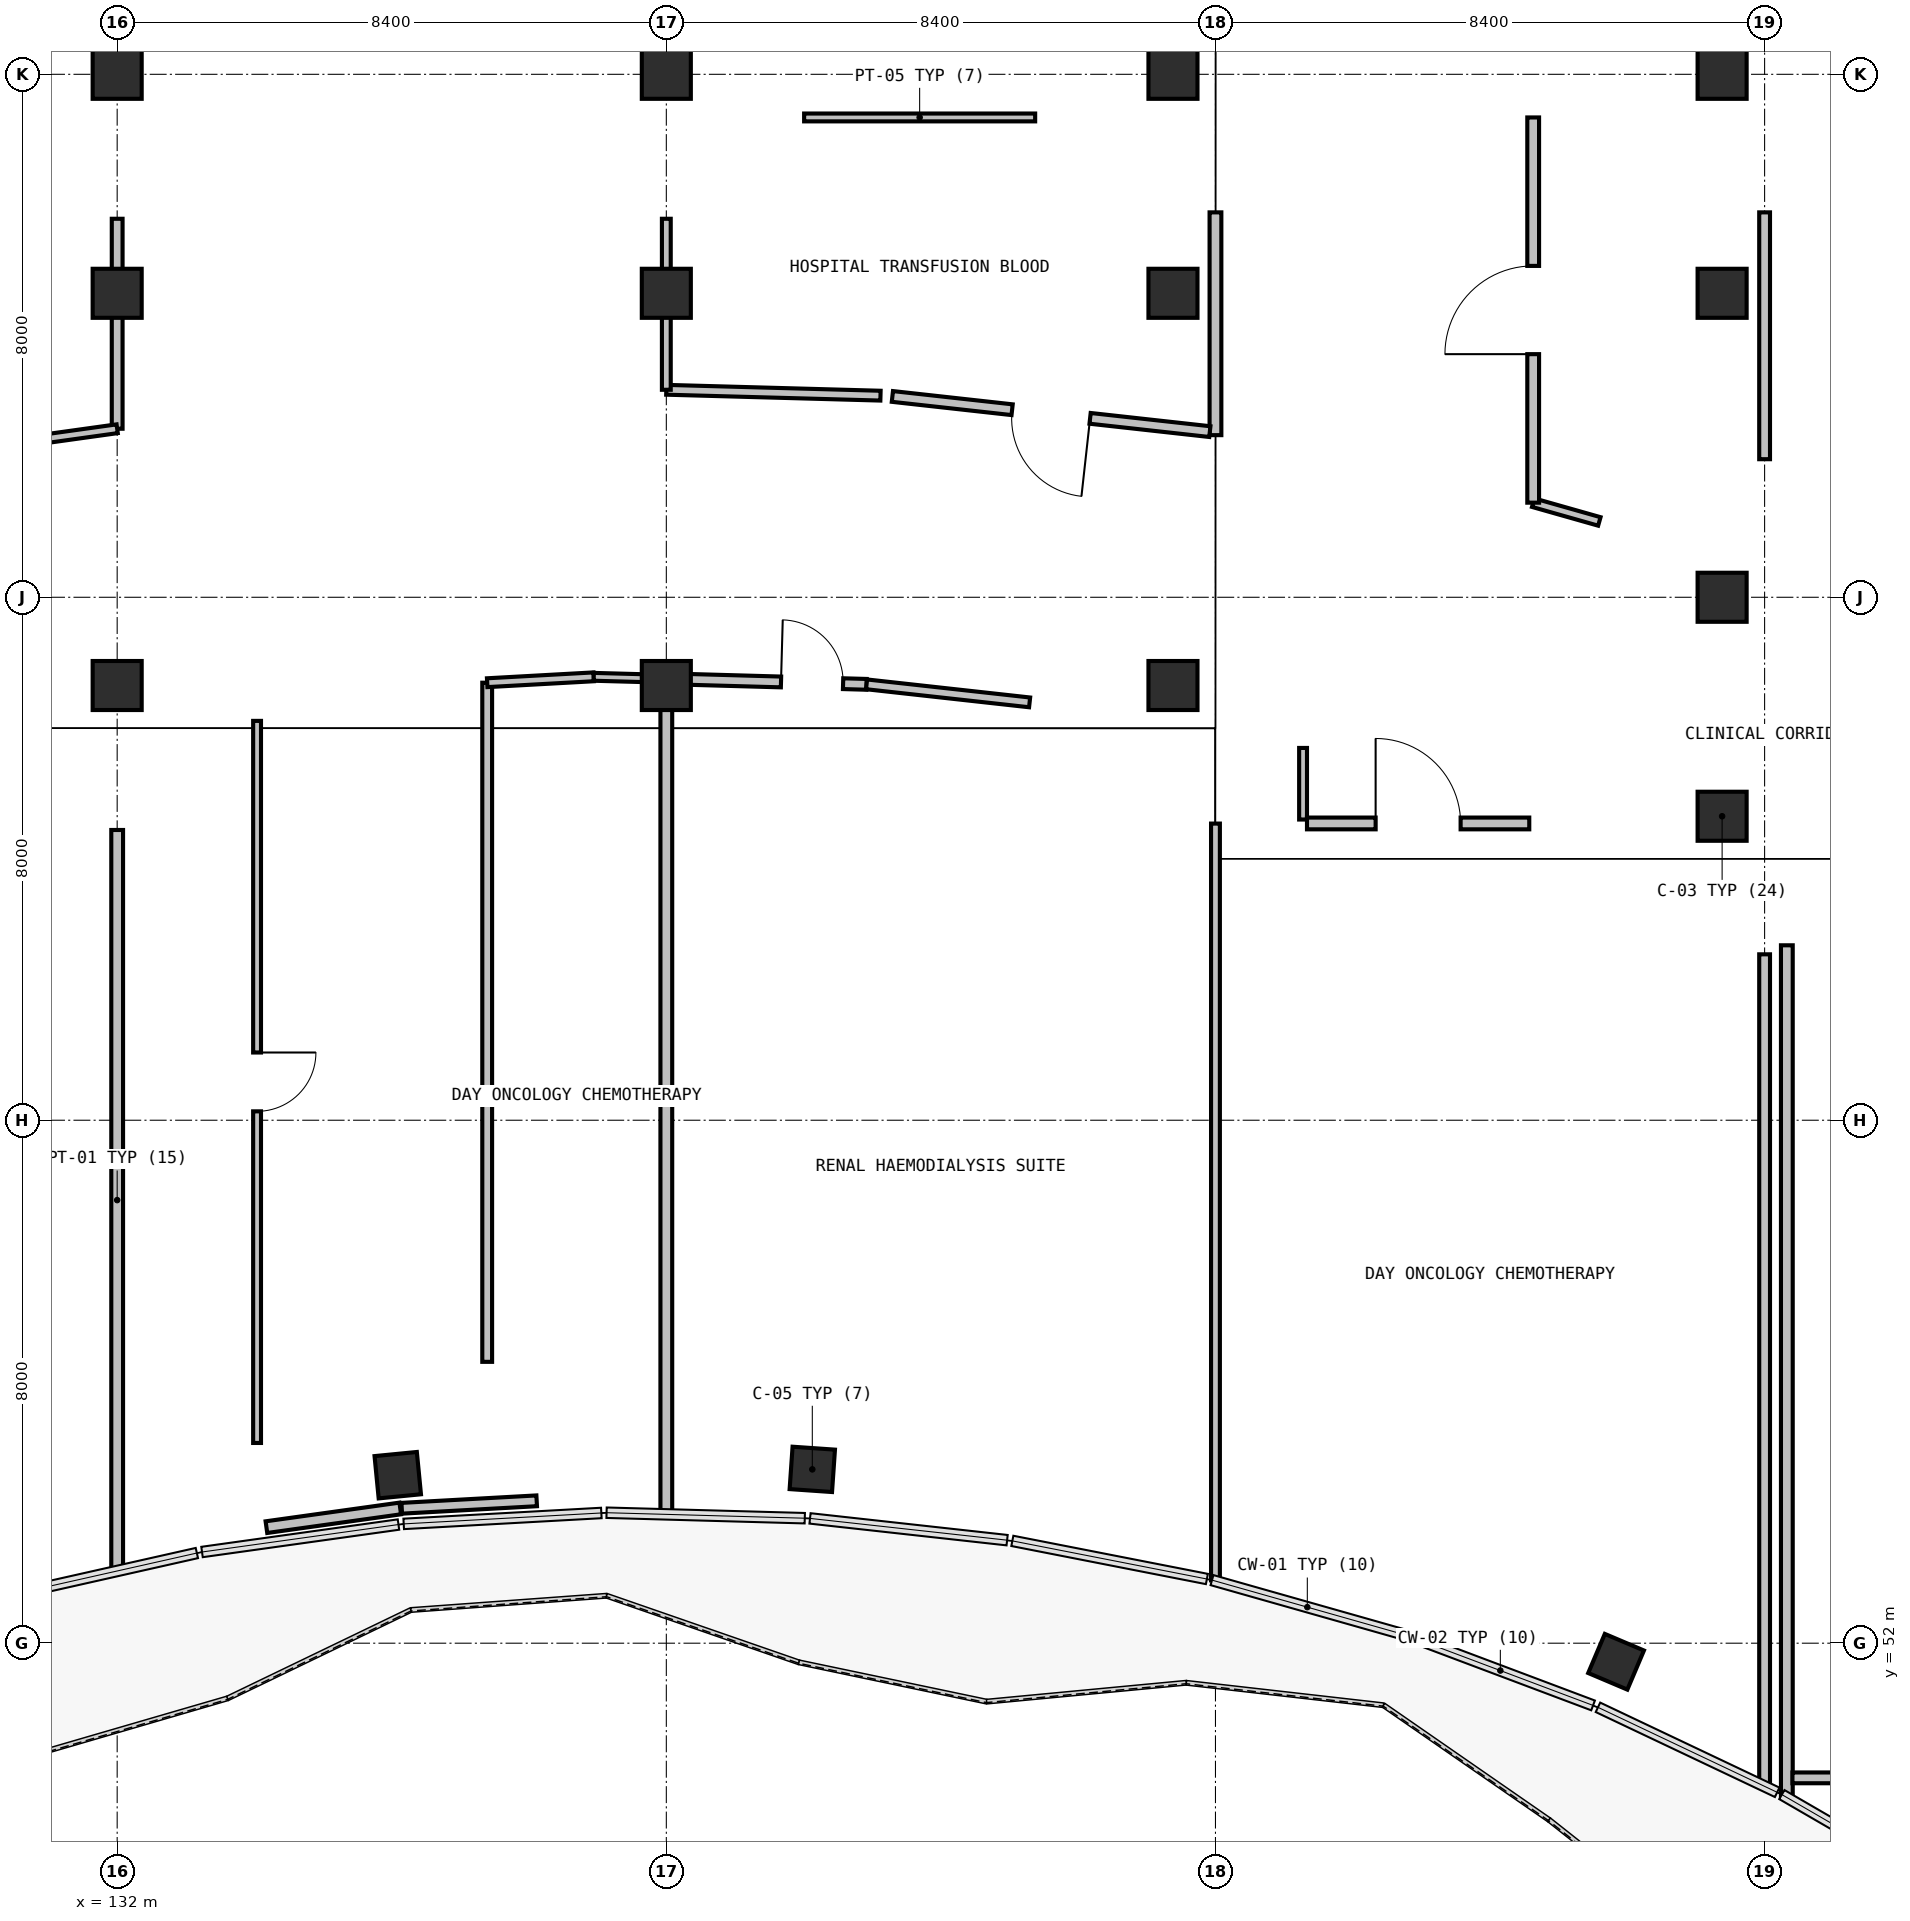
"""IFC4 building model, lengths in metres.
Left out: names, types, materials, properties, quantities, classifications, styles, units other than length and angle.
Written with IfcOpenShell. Run it as: python <this file> out.ifc"""

import sys

from ifc_helpers import new_model, si_unit, direction, frame, frame_2d, origin, origin_2d, place, context, subcontext, project, spatial, rectangle, extrude, element, fill, save


model = new_model("IFC4")
c1 = context("Model", 3, precision=1e-05, world=origin(), true_north=direction((0.0, 1.0)))
c2 = subcontext(c1, "Body", "Model", "MODEL_VIEW")
j1 = project(units=[si_unit("LENGTHUNIT", "METRE"), si_unit("PLANEANGLEUNIT", "RADIAN")], contexts=[c1])
p1 = place(None, origin())
s1 = spatial("IfcSite", under=j1, at=p1, CompositionType="ELEMENT")
p2 = place(p1, origin())
s2 = spatial("IfcBuilding", under=s1, at=p2, CompositionType="ELEMENT")
p3 = place(p2, frame((0.0, 0.0, 15.0)))
s3 = spatial("IfcBuildingStorey", under=s2, at=p3, CompositionType="ELEMENT", Elevation=15.0)
for number, where, z_axis, x_axis in (
    (1, (132.0, 66.65, 0.0), (0.0, 0.0, 1.0), (1.0, 0.0, 0.0)),
    (2, (132.0, 72.65, 0.0), (0.0, 0.0, 1.0), (1.0, 0.0, 0.0)),
    (3, (132.0, 76.0, 0.0), (0.0, 0.0, 1.0), (1.0, 0.0, 0.0)),
    (4, (140.4, 66.65, 0.0), (0.0, 0.0, 1.0), (1.0, 0.0, 0.0)),
    (5, (140.4, 72.65, 0.0), (0.0, 0.0, 1.0), (1.0, 0.0, 0.0)),
    (6, (140.4, 76.0, 0.0), (0.0, 0.0, 1.0), (1.0, 0.0, 0.0)),
    (7, (148.15, 66.65, 0.0), (0.0, 0.0, 1.0), (1.0, 0.0, 0.0)),
    (8, (148.15, 72.65, 0.0), (0.0, 0.0, 1.0), (1.0, 0.0, 0.0)),
    (9, (148.15, 76.0, 0.0), (0.0, 0.0, 1.0), (1.0, 0.0, 0.0)),
    (10, (156.55, 64.65, 0.0), (0.0, 0.0, 1.0), (1.0, 0.0, 0.0)),
    (11, (156.55, 68.0, 0.0), (0.0, 0.0, 1.0), (1.0, 0.0, 0.0)),
    (12, (156.55, 72.65, 0.0), (0.0, 0.0, 1.0), (1.0, 0.0, 0.0)),
    (13, (156.55, 76.0, 0.0), (0.0, 0.0, 1.0), (1.0, 0.0, 0.0)),
):
    element("IfcColumn", number, at=place(p3, frame(where, z_axis=z_axis, x_axis=x_axis)), inside=s3, PredefinedType="COLUMN", context=c2, shape_type="SweptSolid", body=[
        extrude(rectangle(XDim=0.75, YDim=0.75, at=origin_2d()), origin(), (0.0, 0.0, 1.0), 4.2),
    ])
for number, where, z_axis, x_axis in (
    (14, (136.292, 54.57, 0.0), (0.0, 0.0, 1.0), (-0.097, 0.995, 0.0)),
    (15, (142.633, 54.659, 0.0), (0.0, 0.0, 1.0), (0.069, 0.998, 0.0)),
    (16, (154.928, 51.716, 0.0), (0.0, 0.0, 1.0), (0.39, 0.921, 0.0)),
):
    element("IfcColumn", number, at=place(p3, frame(where, z_axis=z_axis, x_axis=x_axis)), inside=s3, PredefinedType="COLUMN", context=c2, shape_type="SweptSolid", body=[
        extrude(rectangle(XDim=0.65, YDim=0.65, at=origin_2d()), origin(), (0.0, 0.0, 1.0), 3.91),
    ])
p4 = place(p3, frame((132.0, 64.44, 0.0), z_axis=(0.0, 0.0, 1.0), x_axis=(0.0, -1.0, 0.0)))
e17 = element("IfcWall", 17, at=p4, inside=s3, PredefinedType="PARTITIONING", context=c2, shape_type="SweptSolid", body=[
    extrude(rectangle(XDim=11.324, YDim=0.18, at=frame_2d((5.662, 0.0))), origin(), (0.0, 0.0, 1.0), 3.895),
])
p5 = place(p3, frame((132.0, 73.79, 0.0), z_axis=(0.0, 0.0, 1.0), x_axis=(0.0, -1.0, 0.0)))
e18 = element("IfcWall", 18, at=p5, inside=s3, PredefinedType="PARTITIONING", context=c2, shape_type="SweptSolid", body=[
    extrude(rectangle(XDim=3.212, YDim=0.165, at=frame_2d((1.606, 0.0))), origin(), (0.0, 0.0, 1.0), 3.245),
])
p6 = place(p3, frame((132.0, 70.578, 0.0), z_axis=(0.0, 0.0, 1.0), x_axis=(-0.990423758249, -0.13806078044, 0.0)))
e19 = element("IfcWall", 19, at=p6, inside=s3, PredefinedType="PARTITIONING", context=c2, shape_type="SweptSolid", body=[
    extrude(rectangle(XDim=1.729, YDim=0.135, at=frame_2d((0.865, 0.0))), origin(), (0.0, 0.0, 1.0), 3.895),
])
p7 = place(p3, frame((134.14, 66.109, 0.0), z_axis=(0.0, 0.0, 1.0), x_axis=(0.0, -1.0, 0.0)))
e20 = element("IfcWall", 20, at=p7, inside=s3, PredefinedType="PARTITIONING", context=c2, shape_type="SweptSolid", body=[
    extrude(rectangle(XDim=11.046, YDim=0.12, at=frame_2d((5.523, 0.0))), origin(), (0.0, 0.0, 1.0), 3.895),
])
p8 = place(p7, frame((5.073, 0.0, 0.0)))
e21 = element("IfcOpeningElement", 21, at=p8, cuts=e20, PredefinedType="OPENING", context=c2, shape_type="SweptSolid", body=[
    extrude(rectangle(XDim=0.9, YDim=2.1, at=frame_2d((0.45, 1.05))), frame((0.0, 0.07, 0.0), z_axis=(0.0, -1.0, 0.0), x_axis=(1.0, 0.0, 0.0)), (0.0, 0.0, 1.0), 0.14),
])
p9 = place(p3, frame((134.283, 53.775, 0.0), z_axis=(0.0, 0.0, 1.0), x_axis=(0.990372536163, 0.138427741489, 0.0)))
e22 = element("IfcWall", 22, at=p9, inside=s3, PredefinedType="PARTITIONING", context=c2, shape_type="SweptSolid", body=[
    extrude(rectangle(XDim=2.067, YDim=0.18, at=frame_2d((1.034, 0.0))), origin(), (0.0, 0.0, 1.0), 3.895),
])
p10 = place(p3, frame((136.353, 54.064, 0.0), z_axis=(0.0, 0.0, 1.0), x_axis=(0.998477747352, 0.055156033595, 0.0)))
e23 = element("IfcWall", 23, at=p10, inside=s3, PredefinedType="PARTITIONING", context=c2, shape_type="SweptSolid", body=[
    extrude(rectangle(XDim=2.067, YDim=0.165, at=frame_2d((1.034, 0.0))), origin(), (0.0, 0.0, 1.0), 3.895),
])
p11 = place(p3, frame((137.66, 56.304, 0.0), z_axis=(0.0, 0.0, 1.0), x_axis=(0.0, 1.0, 0.0)))
e24 = element("IfcWall", 24, at=p11, inside=s3, PredefinedType="PARTITIONING", context=c2, shape_type="SweptSolid", body=[
    extrude(rectangle(XDim=10.389, YDim=0.15, at=frame_2d((5.195, 0.0))), origin(), (0.0, 0.0, 1.0), 3.895),
])
p12 = place(p3, frame((137.66, 66.693, 0.0), z_axis=(0.0, 0.0, 1.0), x_axis=(0.998484643385, 0.055031054181, 0.0)))
e25 = element("IfcWall", 25, at=p12, inside=s3, PredefinedType="PARTITIONING", context=c2, shape_type="SweptSolid", body=[
    extrude(rectangle(XDim=1.633, YDim=0.135, at=frame_2d((0.816, 0.0))), origin(), (0.0, 0.0, 1.0), 3.195),
])
p13 = place(p3, frame((139.29, 66.783, 0.0), z_axis=(0.0, 0.0, 1.0), x_axis=(0.999634166902, -0.027046854934, 0.0)))
e26 = element("IfcWall", 26, at=p13, inside=s3, PredefinedType="PARTITIONING", context=c2, shape_type="SweptSolid", body=[
    extrude(rectangle(XDim=1.11, YDim=0.12, at=frame_2d((0.555, 0.0))), origin(), (0.0, 0.0, 1.0), 3.195),
])
p14 = place(p3, frame((140.4, 66.753, 0.0), z_axis=(0.0, 0.0, 1.0), x_axis=(0.0, -1.0, 0.0)))
e27 = element("IfcWall", 27, at=p14, inside=s3, PredefinedType="PARTITIONING", context=c2, shape_type="SweptSolid", body=[
    extrude(rectangle(XDim=12.771, YDim=0.18, at=frame_2d((6.385, 0.0))), origin(), (0.0, 0.0, 1.0), 3.895),
])
p15 = place(p3, frame((140.486, 66.751, 0.0), z_axis=(0.0, 0.0, 1.0), x_axis=(0.999611444096, -0.02787401714, 0.0)))
e28 = element("IfcWall", 28, at=p15, inside=s3, PredefinedType="PARTITIONING", context=c2, shape_type="SweptSolid", body=[
    extrude(rectangle(XDim=2.978, YDim=0.165, at=frame_2d((1.489, 0.0))), origin(), (0.0, 0.0, 1.0), 3.195),
])
p16 = place(p15, frame((1.669, 0.0, 0.0)))
e29 = element("IfcOpeningElement", 29, at=p16, cuts=e28, PredefinedType="OPENING", context=c2, shape_type="SweptSolid", body=[
    extrude(rectangle(XDim=0.95, YDim=2.1, at=frame_2d((0.475, 1.05))), frame((0.0, 0.093, 0.0), z_axis=(0.0, -1.0, 0.0), x_axis=(1.0, 0.0, 0.0)), (0.0, 0.0, 1.0), 0.185),
])
p17 = place(p3, frame((143.463, 66.668, 0.0), z_axis=(0.0, 0.0, 1.0), x_axis=(0.993938191899, -0.109940305095, 0.0)))
e30 = element("IfcWall", 30, at=p17, inside=s3, PredefinedType="PARTITIONING", context=c2, shape_type="SweptSolid", body=[
    extrude(rectangle(XDim=2.509, YDim=0.15, at=frame_2d((1.255, 0.0))), origin(), (0.0, 0.0, 1.0), 3.195),
])
p18 = place(p3, frame((148.8, 64.538, 0.0), z_axis=(0.0, 0.0, 1.0), x_axis=(0.0, -1.0, 0.0)))
e31 = element("IfcWall", 31, at=p18, inside=s3, PredefinedType="PARTITIONING", context=c2, shape_type="SweptSolid", body=[
    extrude(rectangle(XDim=11.577, YDim=0.135, at=frame_2d((5.789, 0.0))), origin(), (0.0, 0.0, 1.0), 3.895),
])
p19 = place(p3, frame((142.508, 75.34, 0.0), z_axis=(0.0, 0.0, 1.0), x_axis=(1.0, 0.0, 0.0)))
e32 = element("IfcWall", 32, at=p19, inside=s3, PredefinedType="PARTITIONING", context=c2, shape_type="SweptSolid", body=[
    extrude(rectangle(XDim=3.534, YDim=0.12, at=frame_2d((1.767, 0.0))), origin(), (0.0, 0.0, 1.0), 3.895),
])
p20 = place(p3, frame((148.8, 73.888, 0.0), z_axis=(0.0, 0.0, 1.0), x_axis=(0.0, -1.0, 0.0)))
e33 = element("IfcWall", 33, at=p20, inside=s3, PredefinedType="PARTITIONING", context=c2, shape_type="SweptSolid", body=[
    extrude(rectangle(XDim=3.408, YDim=0.18, at=frame_2d((1.704, 0.0))), origin(), (0.0, 0.0, 1.0), 3.895),
])
p21 = place(p3, frame((148.714, 70.534, 0.0), z_axis=(0.0, 0.0, 1.0), x_axis=(-0.993917204148, 0.110129883764, 0.0)))
e34 = element("IfcWall", 34, at=p21, inside=s3, PredefinedType="PARTITIONING", context=c2, shape_type="SweptSolid", body=[
    extrude(rectangle(XDim=4.886, YDim=0.165, at=frame_2d((2.443, 0.0))), origin(), (0.0, 0.0, 1.0), 3.895),
])
p22 = place(p21, frame((1.843, 0.0, 0.0)))
e35 = element("IfcOpeningElement", 35, at=p22, cuts=e34, PredefinedType="OPENING", context=c2, shape_type="SweptSolid", body=[
    extrude(rectangle(XDim=1.2, YDim=2.15, at=frame_2d((0.6, 1.075))), frame((0.0, 0.093, 0.0), z_axis=(0.0, -1.0, 0.0), x_axis=(1.0, 0.0, 0.0)), (0.0, 0.0, 1.0), 0.185),
])
p23 = place(p3, frame((143.676, 71.084, 0.0), z_axis=(0.0, 0.0, 1.0), x_axis=(-0.999622135389, 0.02748793263, 0.0)))
e36 = element("IfcWall", 36, at=p23, inside=s3, PredefinedType="PARTITIONING", context=c2, shape_type="SweptSolid", body=[
    extrude(rectangle(XDim=3.277, YDim=0.15, at=frame_2d((1.639, 0.0))), origin(), (0.0, 0.0, 1.0), 3.895),
])
p24 = place(p3, frame((140.4, 71.174, 0.0), z_axis=(0.0, 0.0, 1.0), x_axis=(0.0, 1.0, 0.0)))
e37 = element("IfcWall", 37, at=p24, inside=s3, PredefinedType="PARTITIONING", context=c2, shape_type="SweptSolid", body=[
    extrude(rectangle(XDim=2.616, YDim=0.135, at=frame_2d((1.308, 0.0))), origin(), (0.0, 0.0, 1.0), 3.245),
])
p25 = place(p3, frame((150.14, 65.695, 0.0), z_axis=(0.0, 0.0, 1.0), x_axis=(0.0, -1.0, 0.0)))
e38 = element("IfcWall", 38, at=p25, inside=s3, PredefinedType="PARTITIONING", context=c2, shape_type="SweptSolid", body=[
    extrude(rectangle(XDim=1.095, YDim=0.12, at=frame_2d((0.547, 0.0))), origin(), (0.0, 0.0, 1.0), 3.895),
])
p26 = place(p3, frame((150.2, 64.54, 0.0), z_axis=(0.0, 0.0, 1.0), x_axis=(1.0, 0.0, 0.0)))
e39 = element("IfcWall", 39, at=p26, inside=s3, PredefinedType="PARTITIONING", context=c2, shape_type="SweptSolid", body=[
    extrude(rectangle(XDim=3.4, YDim=0.18, at=frame_2d((1.7, 0.0))), origin(), (0.0, 0.0, 1.0), 3.895),
])
p27 = place(p26, frame((1.05, 0.0, 0.0)))
e40 = element("IfcOpeningElement", 40, at=p27, cuts=e39, PredefinedType="OPENING", context=c2, shape_type="SweptSolid", body=[
    extrude(rectangle(XDim=1.3, YDim=2.15, at=frame_2d((0.65, 1.075))), frame((0.0, 0.1, 0.0), z_axis=(0.0, -1.0, 0.0), x_axis=(1.0, 0.0, 0.0)), (0.0, 0.0, 1.0), 0.2),
])
p28 = place(p3, frame((157.2, 62.538, 0.0), z_axis=(0.0, 0.0, 1.0), x_axis=(0.0, -1.0, 0.0)))
e41 = element("IfcWall", 41, at=p28, inside=s3, PredefinedType="PARTITIONING", context=c2, shape_type="SweptSolid", body=[
    extrude(rectangle(XDim=12.715, YDim=0.165, at=frame_2d((6.357, 0.0))), origin(), (0.0, 0.0, 1.0), 3.895),
])
p29 = place(p3, frame((157.2, 73.888, 0.0), z_axis=(0.0, 0.0, 1.0), x_axis=(0.0, -1.0, 0.0)))
e42 = element("IfcWall", 42, at=p29, inside=s3, PredefinedType="PARTITIONING", context=c2, shape_type="SweptSolid", body=[
    extrude(rectangle(XDim=3.776, YDim=0.165, at=frame_2d((1.888, 0.0))), origin(), (0.0, 0.0, 1.0), 3.895),
])
p30 = place(p3, frame((154.672, 69.16, 0.0), z_axis=(0.0, 0.0, 1.0), x_axis=(-0.962047568244, 0.272881799386, 0.0)))
e43 = element("IfcWall", 43, at=p30, inside=s3, PredefinedType="PARTITIONING", context=c2, shape_type="SweptSolid", body=[
    extrude(rectangle(XDim=1.052, YDim=0.135, at=frame_2d((0.526, 0.0))), origin(), (0.0, 0.0, 1.0), 3.895),
])
p31 = place(p3, frame((153.66, 69.447, 0.0), z_axis=(0.0, 0.0, 1.0), x_axis=(0.0, 1.0, 0.0)))
e44 = element("IfcWall", 44, at=p31, inside=s3, PredefinedType="PARTITIONING", context=c2, shape_type="SweptSolid", body=[
    extrude(rectangle(XDim=5.893, YDim=0.18, at=frame_2d((2.947, 0.0))), origin(), (0.0, 0.0, 1.0), 3.895),
])
p32 = place(p31, frame((2.272, 0.0, 0.0)))
e45 = element("IfcOpeningElement", 45, at=p32, cuts=e44, PredefinedType="OPENING", context=c2, shape_type="SweptSolid", body=[
    extrude(rectangle(XDim=1.35, YDim=2.15, at=frame_2d((0.675, 1.075))), frame((0.0, 0.1, 0.0), z_axis=(0.0, -1.0, 0.0), x_axis=(1.0, 0.0, 0.0)), (0.0, 0.0, 1.0), 0.2),
])
p33 = place(p3, frame((157.54, 62.676, 0.0), z_axis=(0.0, 0.0, 1.0), x_axis=(0.0, -1.0, 0.0)))
e46 = element("IfcWall", 46, at=p33, inside=s3, PredefinedType="PARTITIONING", context=c2, shape_type="SweptSolid", body=[
    extrude(rectangle(XDim=13.023, YDim=0.18, at=frame_2d((6.511, 0.0))), origin(), (0.0, 0.0, 1.0), 3.895),
])
p34 = place(p3, frame((157.626, 49.94, 0.0), z_axis=(0.0, 0.0, 1.0), x_axis=(1.0, 0.0, 0.0)))
e47 = element("IfcWall", 47, at=p34, inside=s3, PredefinedType="PARTITIONING", context=c2, shape_type="SweptSolid", body=[
    extrude(rectangle(XDim=3.374, YDim=0.165, at=frame_2d((1.687, 0.0))), origin(), (0.0, 0.0, 1.0), 3.895),
])
p35 = place(p8, origin())
e48 = element("IfcDoor", 48, at=p35, inside=s3, OperationType="SINGLE_SWING_LEFT", PredefinedType="DOOR", context=c2, shape_type="SweptSolid", body=[
    extrude(rectangle(XDim=0.9, YDim=2.1, at=frame_2d((0.45, 1.05))), frame((0.0, 0.025, 0.0), z_axis=(0.0, -1.0, 0.0), x_axis=(1.0, 0.0, 0.0)), (0.0, 0.0, 1.0), 0.05),
])
fill(e21, e48)
p36 = place(p16, origin())
e49 = element("IfcDoor", 49, at=p36, inside=s3, OperationType="SINGLE_SWING_RIGHT", PredefinedType="DOOR", context=c2, shape_type="SweptSolid", body=[
    extrude(rectangle(XDim=0.95, YDim=2.1, at=frame_2d((0.475, 1.05))), frame((0.0, 0.025, 0.0), z_axis=(0.0, -1.0, 0.0), x_axis=(1.0, 0.0, 0.0)), (0.0, 0.0, 1.0), 0.05),
])
fill(e29, e49)
p37 = place(p22, origin())
e50 = element("IfcDoor", 50, at=p37, inside=s3, OperationType="SINGLE_SWING_LEFT", PredefinedType="DOOR", context=c2, shape_type="SweptSolid", body=[
    extrude(rectangle(XDim=1.2, YDim=2.15, at=frame_2d((0.6, 1.075))), frame((0.0, 0.025, 0.0), z_axis=(0.0, -1.0, 0.0), x_axis=(1.0, 0.0, 0.0)), (0.0, 0.0, 1.0), 0.05),
])
fill(e35, e50)
p38 = place(p27, origin())
e51 = element("IfcDoor", 51, at=p38, inside=s3, OperationType="SINGLE_SWING_RIGHT", PredefinedType="DOOR", context=c2, shape_type="SweptSolid", body=[
    extrude(rectangle(XDim=1.3, YDim=2.15, at=frame_2d((0.65, 1.075))), frame((0.0, 0.025, 0.0), z_axis=(0.0, -1.0, 0.0), x_axis=(1.0, 0.0, 0.0)), (0.0, 0.0, 1.0), 0.05),
])
fill(e40, e51)
p39 = place(p32, origin())
e52 = element("IfcDoor", 52, at=p39, inside=s3, OperationType="SINGLE_SWING_LEFT", PredefinedType="DOOR", context=c2, shape_type="SweptSolid", body=[
    extrude(rectangle(XDim=1.35, YDim=2.15, at=frame_2d((0.675, 1.075))), frame((0.0, 0.025, 0.0), z_axis=(0.0, -1.0, 0.0), x_axis=(1.0, 0.0, 0.0)), (0.0, 0.0, 1.0), 0.05),
])
fill(e45, e52)
save(model, sys.argv[1])
